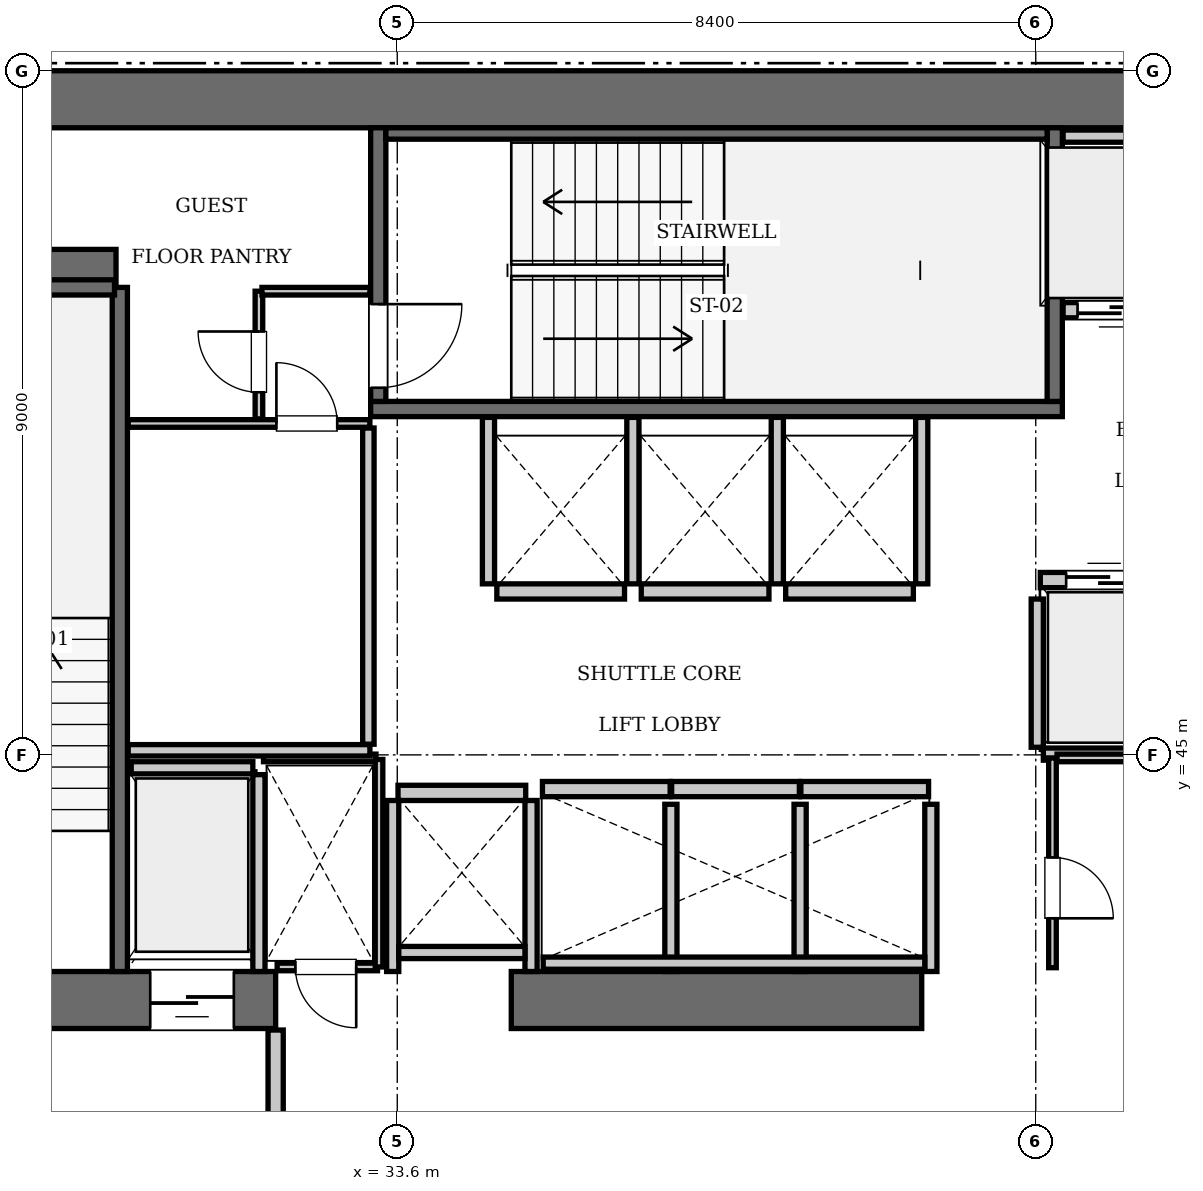
"""IFC4 building model, lengths in metres.
Left out: names, types, materials, properties, quantities, classifications, styles, units other than length and angle.
Written with IfcOpenShell. Run it as: python <this file> out.ifc"""

import sys

from ifc_helpers import new_model, si_unit, direction, frame, frame_2d, origin, place, context, subcontext, project, spatial, rectangle, extrude, element, fill, save


model = new_model("IFC4")
c1 = context("Model", 3, precision=1e-05, world=origin(), true_north=direction((0.0, 1.0)))
c2 = subcontext(c1, "Body", "Model", "MODEL_VIEW")
j1 = project(units=[si_unit("LENGTHUNIT", "METRE"), si_unit("PLANEANGLEUNIT", "RADIAN")], contexts=[c1])
p1 = place(None, origin())
s1 = spatial("IfcSite", under=j1, at=p1, CompositionType="ELEMENT")
p2 = place(p1, origin())
s2 = spatial("IfcBuilding", under=s1, at=p2, CompositionType="ELEMENT")
p3 = place(p2, frame((0.0, 0.0, 131.25)))
s3 = spatial("IfcBuildingStorey", under=s2, at=p3, CompositionType="ELEMENT", Elevation=131.25)
p4 = place(p3, frame((25.2, 53.625, 0.0), z_axis=(0.0, 0.0, 1.0), x_axis=(1.0, 0.0, 0.0)))
e1 = element("IfcWall", 1, at=p4, inside=s3, PredefinedType="SHEAR", context=c2, shape_type="SweptSolid", body=[
    extrude(rectangle(XDim=25.2, YDim=0.75, at=frame_2d((12.6, 0.0))), origin(), (0.0, 0.0, 1.0), 3.85),
])
p5 = place(p3, frame((25.2, 41.775, 0.0), z_axis=(0.0, 0.0, 1.0), x_axis=(1.0, 0.0, 0.0)))
e2 = element("IfcWall", 2, at=p5, inside=s3, PredefinedType="SHEAR", context=c2, shape_type="SweptSolid", body=[
    extrude(rectangle(XDim=6.8, YDim=0.75, at=frame_2d((3.4, 0.0))), origin(), (0.0, 0.0, 1.0), 3.85),
])
p6 = place(p5, frame((1.65, 0.0, 0.0)))
e3 = element("IfcOpeningElement", 3, at=p6, cuts=e2, PredefinedType="OPENING", context=c2, shape_type="SweptSolid", body=[
    extrude(rectangle(XDim=1.15, YDim=2.15, at=frame_2d((0.575, 1.075))), frame((0.0, 0.385, 0.0), z_axis=(0.0, -1.0, 0.0), x_axis=(1.0, 0.0, 0.0)), (0.0, 0.0, 1.0), 0.77),
])
p7 = place(p5, frame((5.15, 0.0, 0.0)))
e4 = element("IfcOpeningElement", 4, at=p7, cuts=e2, PredefinedType="OPENING", context=c2, shape_type="SweptSolid", body=[
    extrude(rectangle(XDim=1.1, YDim=2.2, at=frame_2d((0.55, 1.1))), frame((0.0, 0.385, 0.0), z_axis=(0.0, -1.0, 0.0), x_axis=(1.0, 0.0, 0.0)), (0.0, 0.0, 1.0), 0.77),
])
p8 = place(p3, frame((35.1, 41.775, 0.0), z_axis=(0.0, 0.0, 1.0), x_axis=(1.0, 0.0, 0.0)))
e5 = element("IfcWall", 5, at=p8, inside=s3, PredefinedType="SHEAR", context=c2, shape_type="SweptSolid", body=[
    extrude(rectangle(XDim=5.4, YDim=0.75, at=frame_2d((2.7, 0.0))), origin(), (0.0, 0.0, 1.0), 3.85),
])
p9 = place(p3, frame((25.95, 51.4, 0.0), z_axis=(0.0, 0.0, 1.0), x_axis=(1.0, 0.0, 0.0)))
e6 = element("IfcWall", 6, at=p9, inside=s3, PredefinedType="SHEAR", context=c2, shape_type="SweptSolid", body=[
    extrude(rectangle(XDim=3.95, YDim=0.5, at=frame_2d((1.975, 0.0))), origin(), (0.0, 0.0, 1.0), 3.85),
])
p10 = place(p3, frame((29.95, 42.15, 0.0), z_axis=(0.0, 0.0, 1.0), x_axis=(0.0, 1.0, 0.0)))
e7 = element("IfcWall", 7, at=p10, inside=s3, PredefinedType="SOLIDWALL", context=c2, shape_type="SweptSolid", body=[
    extrude(rectangle(XDim=9.0, YDim=0.2, at=frame_2d((4.5, 0.0))), origin(), (0.0, 0.0, 1.0), 3.61),
])
p11 = place(p3, frame((26.38, 51.15, 0.0), z_axis=(0.0, 0.0, 1.0), x_axis=(1.0, 0.0, 0.0)))
e8 = element("IfcWall", 8, at=p11, inside=s3, PredefinedType="SOLIDWALL", context=c2, shape_type="SweptSolid", body=[
    extrude(rectangle(XDim=3.5, YDim=0.2, at=frame_2d((1.75, 0.0))), origin(), (0.0, 0.0, 1.0), 3.61),
])
p12 = place(p3, frame((33.25, 49.55, 0.0), z_axis=(0.0, 0.0, 1.0), x_axis=(1.0, 0.0, 0.0)))
e9 = element("IfcWall", 9, at=p12, inside=s3, PredefinedType="SOLIDWALL", context=c2, shape_type="SweptSolid", body=[
    extrude(rectangle(XDim=9.1, YDim=0.2, at=frame_2d((4.55, 0.0))), origin(), (0.0, 0.0, 1.0), 3.61),
])
p13 = place(p3, frame((42.25, 49.65, 0.0), z_axis=(0.0, 0.0, 1.0), x_axis=(0.0, 1.0, 0.0)))
e10 = element("IfcWall", 10, at=p13, inside=s3, PredefinedType="SOLIDWALL", context=c2, shape_type="SweptSolid", body=[
    extrude(rectangle(XDim=3.6, YDim=0.2, at=frame_2d((1.8, 0.0))), origin(), (0.0, 0.0, 1.0), 3.61),
])
p14 = place(p3, frame((33.35, 49.65, 0.0), z_axis=(0.0, 0.0, 1.0), x_axis=(0.0, 1.0, 0.0)))
e11 = element("IfcWall", 11, at=p14, inside=s3, PredefinedType="SOLIDWALL", context=c2, shape_type="SweptSolid", body=[
    extrude(rectangle(XDim=3.6, YDim=0.2, at=frame_2d((1.8, 0.0))), origin(), (0.0, 0.0, 1.0), 3.61),
])
p15 = place(p14, frame((0.18, 0.0, 0.0)))
e12 = element("IfcOpeningElement", 12, at=p15, cuts=e11, PredefinedType="OPENING", context=c2, shape_type="SweptSolid", body=[
    extrude(rectangle(XDim=1.1, YDim=2.15, at=frame_2d((0.55, 1.075))), frame((0.0, 0.11, 0.0), z_axis=(0.0, -1.0, 0.0), x_axis=(1.0, 0.0, 0.0)), (0.0, 0.0, 1.0), 0.22),
])
p16 = place(p3, frame((33.45, 53.175, 0.0), z_axis=(0.0, 0.0, 1.0), x_axis=(1.0, 0.0, 0.0)))
e13 = element("IfcWall", 13, at=p16, inside=s3, PredefinedType="SOLIDWALL", context=c2, shape_type="SweptSolid", body=[
    extrude(rectangle(XDim=8.7, YDim=0.15, at=frame_2d((4.35, 0.0))), origin(), (0.0, 0.0, 1.0), 3.61),
])
p17 = place(p3, frame((42.06, 47.3, 0.0), z_axis=(0.0, 0.0, 1.0), x_axis=(1.0, 0.0, 0.0)))
e14 = element("IfcWall", 14, at=p17, inside=s3, PredefinedType="SOLIDWALL", context=c2, shape_type="SweptSolid", body=[
    extrude(rectangle(XDim=1.68, YDim=0.2, at=frame_2d((0.84, 0.0))), origin(), (0.0, 0.0, 1.0), 3.61),
])
p18 = place(p17, frame((0.34, 0.0, 0.0)))
e15 = element("IfcOpeningElement", 15, at=p18, cuts=e14, PredefinedType="OPENING", context=c2, shape_type="SweptSolid", body=[
    extrude(rectangle(XDim=1.0, YDim=2.15, at=frame_2d((0.5, 1.075))), frame((0.0, 0.11, 0.0), z_axis=(0.0, -1.0, 0.0), x_axis=(1.0, 0.0, 0.0)), (0.0, 0.0, 1.0), 0.22),
])
p19 = place(p3, frame((42.36, 50.85, 0.0), z_axis=(0.0, 0.0, 1.0), x_axis=(1.0, 0.0, 0.0)))
e16 = element("IfcWall", 16, at=p19, inside=s3, PredefinedType="SOLIDWALL", context=c2, shape_type="SweptSolid", body=[
    extrude(rectangle(XDim=1.38, YDim=0.2, at=frame_2d((0.69, 0.0))), origin(), (0.0, 0.0, 1.0), 3.61),
])
p20 = place(p19, frame((0.19, 0.0, 0.0)))
e17 = element("IfcOpeningElement", 17, at=p20, cuts=e16, PredefinedType="OPENING", context=c2, shape_type="SweptSolid", body=[
    extrude(rectangle(XDim=1.0, YDim=2.15, at=frame_2d((0.5, 1.075))), frame((0.0, 0.11, 0.0), z_axis=(0.0, -1.0, 0.0), x_axis=(1.0, 0.0, 0.0)), (0.0, 0.0, 1.0), 0.22),
])
for number, where, z_axis, x_axis in (
    (18, (35.51, 44.55, 0.0), (0.0, 0.0, 1.0), (1.0, 0.0, 0.0)),
    (19, (37.21, 44.55, 0.0), (0.0, 0.0, 1.0), (1.0, 0.0, 0.0)),
):
    element("IfcWall", number, at=place(p3, frame(where, z_axis=z_axis, x_axis=x_axis)), inside=s3, PredefinedType="SOLIDWALL", context=c2, shape_type="SweptSolid", body=[
        extrude(rectangle(XDim=1.68, YDim=0.2, at=frame_2d((0.84, 0.0))), origin(), (0.0, 0.0, 1.0), 3.61),
    ])
for number, where, z_axis, x_axis in (
    (20, (38.91, 44.55, 0.0), (0.0, 0.0, 1.0), (1.0, 0.0, 0.0)),
    (21, (34.91, 47.15, 0.0), (0.0, 0.0, 1.0), (1.0, 0.0, 0.0)),
):
    element("IfcWall", number, at=place(p3, frame(where, z_axis=z_axis, x_axis=x_axis)), inside=s3, PredefinedType="SOLIDWALL", context=c2, shape_type="SweptSolid", body=[
        extrude(rectangle(XDim=1.68, YDim=0.2, at=frame_2d((0.84, 0.0))), origin(), (0.0, 0.0, 1.0), 3.61),
    ])
for number, where, z_axis, x_axis in (
    (22, (36.81, 47.15, 0.0), (0.0, 0.0, 1.0), (1.0, 0.0, 0.0)),
    (23, (38.71, 47.15, 0.0), (0.0, 0.0, 1.0), (1.0, 0.0, 0.0)),
    (24, (33.61, 44.5, 0.0), (0.0, 0.0, 1.0), (1.0, 0.0, 0.0)),
):
    element("IfcWall", number, at=place(p3, frame(where, z_axis=z_axis, x_axis=x_axis)), inside=s3, PredefinedType="SOLIDWALL", context=c2, shape_type="SweptSolid", body=[
        extrude(rectangle(XDim=1.68, YDim=0.2, at=frame_2d((0.84, 0.0))), origin(), (0.0, 0.0, 1.0), 3.61),
    ])
p21 = place(p3, frame((30.1, 44.83, 0.0), z_axis=(0.0, 0.0, 1.0), x_axis=(1.0, 0.0, 0.0)))
e25 = element("IfcWall", 25, at=p21, inside=s3, PredefinedType="SOLIDWALL", context=c2, shape_type="SweptSolid", body=[
    extrude(rectangle(XDim=1.6, YDim=0.16, at=frame_2d((0.8, 0.0))), origin(), (0.0, 0.0, 1.0), 3.61),
])
p22 = place(p3, frame((31.78, 42.15, 0.0), z_axis=(0.0, 0.0, 1.0), x_axis=(0.0, 1.0, 0.0)))
e26 = element("IfcWall", 26, at=p22, inside=s3, PredefinedType="SOLIDWALL", context=c2, shape_type="SweptSolid", body=[
    extrude(rectangle(XDim=2.59, YDim=0.16, at=frame_2d((1.295, 0.0))), origin(), (0.0, 0.0, 1.0), 3.61),
])
p23 = place(p3, frame((42.02, 45.1, 0.0), z_axis=(0.0, 0.0, 1.0), x_axis=(0.0, 1.0, 0.0)))
e27 = element("IfcWall", 27, at=p23, inside=s3, PredefinedType="SOLIDWALL", context=c2, shape_type="SweptSolid", body=[
    extrude(rectangle(XDim=1.95, YDim=0.16, at=frame_2d((0.975, 0.0))), origin(), (0.0, 0.0, 1.0), 3.61),
])
p24 = place(p3, frame((42.1, 45.01, 0.0), z_axis=(0.0, 0.0, 1.0), x_axis=(1.0, 0.0, 0.0)))
e28 = element("IfcWall", 28, at=p24, inside=s3, PredefinedType="SOLIDWALL", context=c2, shape_type="SweptSolid", body=[
    extrude(rectangle(XDim=3.45, YDim=0.16, at=frame_2d((1.725, 0.0))), origin(), (0.0, 0.0, 1.0), 3.61),
])
p25 = place(p3, frame((42.36, 53.14, 0.0), z_axis=(0.0, 0.0, 1.0), x_axis=(1.0, 0.0, 0.0)))
e29 = element("IfcWall", 29, at=p25, inside=s3, PredefinedType="SOLIDWALL", context=c2, shape_type="SweptSolid", body=[
    extrude(rectangle(XDim=3.14, YDim=0.16, at=frame_2d((1.57, 0.0))), origin(), (0.0, 0.0, 1.0), 3.61),
])
for number, where, z_axis, x_axis in (
    (30, (37.2, 42.15, 0.0), (0.0, 0.0, 1.0), (0.0, 1.0, 0.0)),
    (31, (38.9, 42.15, 0.0), (0.0, 0.0, 1.0), (0.0, 1.0, 0.0)),
    (32, (40.62, 42.15, 0.0), (0.0, 0.0, 1.0), (0.0, 1.0, 0.0)),
):
    element("IfcWall", number, at=place(p3, frame(where, z_axis=z_axis, x_axis=x_axis)), inside=s3, PredefinedType="SOLIDWALL", context=c2, shape_type="SweptSolid", body=[
        extrude(rectangle(XDim=2.2, YDim=0.16, at=frame_2d((1.1, 0.0))), origin(), (0.0, 0.0, 1.0), 3.61),
    ])
p26 = place(p3, frame((35.52, 42.26, 0.0), z_axis=(0.0, 0.0, 1.0), x_axis=(1.0, 0.0, 0.0)))
e33 = element("IfcWall", 33, at=p26, inside=s3, PredefinedType="SOLIDWALL", context=c2, shape_type="SweptSolid", body=[
    extrude(rectangle(XDim=5.02, YDim=0.16, at=frame_2d((2.51, 0.0))), origin(), (0.0, 0.0, 1.0), 3.61),
])
for number, where, z_axis, x_axis in (
    (34, (34.8, 47.25, 0.0), (0.0, 0.0, 1.0), (0.0, 1.0, 0.0)),
    (35, (36.7, 47.25, 0.0), (0.0, 0.0, 1.0), (0.0, 1.0, 0.0)),
    (36, (38.6, 47.25, 0.0), (0.0, 0.0, 1.0), (0.0, 1.0, 0.0)),
    (37, (40.5, 47.25, 0.0), (0.0, 0.0, 1.0), (0.0, 1.0, 0.0)),
):
    element("IfcWall", number, at=place(p3, frame(where, z_axis=z_axis, x_axis=x_axis)), inside=s3, PredefinedType="SOLIDWALL", context=c2, shape_type="SweptSolid", body=[
        extrude(rectangle(XDim=2.19, YDim=0.16, at=frame_2d((1.095, 0.0))), origin(), (0.0, 0.0, 1.0), 3.61),
    ])
for number, where, z_axis, x_axis in (
    (38, (33.54, 42.15, 0.0), (0.0, 0.0, 1.0), (0.0, 1.0, 0.0)),
    (39, (35.36, 42.15, 0.0), (0.0, 0.0, 1.0), (0.0, 1.0, 0.0)),
):
    element("IfcWall", number, at=place(p3, frame(where, z_axis=z_axis, x_axis=x_axis)), inside=s3, PredefinedType="SOLIDWALL", context=c2, shape_type="SweptSolid", body=[
        extrude(rectangle(XDim=2.25, YDim=0.16, at=frame_2d((1.125, 0.0))), origin(), (0.0, 0.0, 1.0), 3.61),
    ])
p27 = place(p3, frame((33.62, 42.4, 0.0), z_axis=(0.0, 0.0, 1.0), x_axis=(1.0, 0.0, 0.0)))
e40 = element("IfcWall", 40, at=p27, inside=s3, PredefinedType="SOLIDWALL", context=c2, shape_type="SweptSolid", body=[
    extrude(rectangle(XDim=1.66, YDim=0.16, at=frame_2d((0.83, 0.0))), origin(), (0.0, 0.0, 1.0), 3.61),
])
p28 = place(p3, frame((32.0, 38.31, 0.0), z_axis=(0.0, 0.0, 1.0), x_axis=(0.0, 1.0, 0.0)))
e41 = element("IfcWall", 41, at=p28, inside=s3, PredefinedType="PARTITIONING", context=c2, shape_type="SweptSolid", body=[
    extrude(rectangle(XDim=3.07, YDim=0.2, at=frame_2d((1.535, 0.0))), origin(), (0.0, 0.0, 1.0), 3.61),
])
p29 = place(p3, frame((32.02, 42.21, 0.0), z_axis=(0.0, 0.0, 1.0), x_axis=(1.0, 0.0, 0.0)))
e42 = element("IfcWall", 42, at=p29, inside=s3, PredefinedType="PARTITIONING", context=c2, shape_type="SweptSolid", body=[
    extrude(rectangle(XDim=1.32, YDim=0.1, at=frame_2d((0.66, 0.0))), origin(), (0.0, 0.0, 1.0), 3.61),
])
p30 = place(p29, frame((0.24, 0.0, 0.0)))
e43 = element("IfcOpeningElement", 43, at=p30, cuts=e42, PredefinedType="OPENING", context=c2, shape_type="SweptSolid", body=[
    extrude(rectangle(XDim=0.8, YDim=2.05, at=frame_2d((0.4, 1.025))), frame((0.0, 0.06, 0.0), z_axis=(0.0, -1.0, 0.0), x_axis=(1.0, 0.0, 0.0)), (0.0, 0.0, 1.0), 0.12),
])
p31 = place(p3, frame((31.84, 44.96, 0.0), z_axis=(0.0, 0.0, 1.0), x_axis=(1.0, 0.0, 0.0)))
e44 = element("IfcWall", 44, at=p31, inside=s3, PredefinedType="PARTITIONING", context=c2, shape_type="SweptSolid", body=[
    extrude(rectangle(XDim=1.48, YDim=0.1, at=frame_2d((0.74, 0.0))), origin(), (0.0, 0.0, 1.0), 3.61),
])
p32 = place(p3, frame((33.36, 42.21, 0.0), z_axis=(0.0, 0.0, 1.0), x_axis=(0.0, 1.0, 0.0)))
e45 = element("IfcWall", 45, at=p32, inside=s3, PredefinedType="PARTITIONING", context=c2, shape_type="SweptSolid", body=[
    extrude(rectangle(XDim=2.73, YDim=0.1, at=frame_2d((1.365, 0.0))), origin(), (0.0, 0.0, 1.0), 3.61),
])
p33 = place(p3, frame((42.22, 42.2, 0.0), z_axis=(0.0, 0.0, 1.0), x_axis=(0.0, 1.0, 0.0)))
e46 = element("IfcWall", 46, at=p33, inside=s3, PredefinedType="PARTITIONING", context=c2, shape_type="SweptSolid", body=[
    extrude(rectangle(XDim=2.76, YDim=0.1, at=frame_2d((1.38, 0.0))), origin(), (0.0, 0.0, 1.0), 3.61),
])
p34 = place(p33, frame((0.65, 0.0, 0.0)))
e47 = element("IfcOpeningElement", 47, at=p34, cuts=e46, PredefinedType="OPENING", context=c2, shape_type="SweptSolid", body=[
    extrude(rectangle(XDim=0.8, YDim=2.05, at=frame_2d((0.4, 1.025))), frame((0.0, 0.06, 0.0), z_axis=(0.0, -1.0, 0.0), x_axis=(1.0, 0.0, 0.0)), (0.0, 0.0, 1.0), 0.12),
])
p35 = place(p3, frame((42.28, 44.96, 0.0), z_axis=(0.0, 0.0, 1.0), x_axis=(1.0, 0.0, 0.0)))
e48 = element("IfcWall", 48, at=p35, inside=s3, PredefinedType="PARTITIONING", context=c2, shape_type="SweptSolid", body=[
    extrude(rectangle(XDim=1.3, YDim=0.1, at=frame_2d((0.65, 0.0))), origin(), (0.0, 0.0, 1.0), 3.61),
])
p36 = place(p3, frame((30.06, 45.06, 0.0), z_axis=(0.0, 0.0, 1.0), x_axis=(1.0, 0.0, 0.0)))
e49 = element("IfcWall", 49, at=p36, inside=s3, PredefinedType="PARTITIONING", context=c2, shape_type="SweptSolid", body=[
    extrude(rectangle(XDim=3.18, YDim=0.15, at=frame_2d((1.59, 0.0))), origin(), (0.0, 0.0, 1.0), 3.61),
])
p37 = place(p3, frame((33.22, 45.14, 0.0), z_axis=(0.0, 0.0, 1.0), x_axis=(0.0, 1.0, 0.0)))
e50 = element("IfcWall", 50, at=p37, inside=s3, PredefinedType="PARTITIONING", context=c2, shape_type="SweptSolid", body=[
    extrude(rectangle(XDim=4.16, YDim=0.15, at=frame_2d((2.08, 0.0))), origin(), (0.0, 0.0, 1.0), 3.61),
])
p38 = place(p3, frame((30.06, 49.36, 0.0), z_axis=(0.0, 0.0, 1.0), x_axis=(1.0, 0.0, 0.0)))
e51 = element("IfcWall", 51, at=p38, inside=s3, PredefinedType="PARTITIONING", context=c2, shape_type="SweptSolid", body=[
    extrude(rectangle(XDim=3.18, YDim=0.1, at=frame_2d((1.59, 0.0))), origin(), (0.0, 0.0, 1.0), 3.61),
])
p39 = place(p38, frame((1.95, 0.0, 0.0)))
e52 = element("IfcOpeningElement", 52, at=p39, cuts=e51, PredefinedType="OPENING", context=c2, shape_type="SweptSolid", body=[
    extrude(rectangle(XDim=0.8, YDim=2.05, at=frame_2d((0.4, 1.025))), frame((0.0, 0.06, 0.0), z_axis=(0.0, -1.0, 0.0), x_axis=(1.0, 0.0, 0.0)), (0.0, 0.0, 1.0), 0.12),
])
p40 = place(p3, frame((31.78, 49.42, 0.0), z_axis=(0.0, 0.0, 1.0), x_axis=(0.0, 1.0, 0.0)))
e53 = element("IfcWall", 53, at=p40, inside=s3, PredefinedType="PARTITIONING", context=c2, shape_type="SweptSolid", body=[
    extrude(rectangle(XDim=1.68, YDim=0.1, at=frame_2d((0.84, 0.0))), origin(), (0.0, 0.0, 1.0), 3.61),
])
p41 = place(p40, frame((0.35, 0.0, 0.0)))
e54 = element("IfcOpeningElement", 54, at=p41, cuts=e53, PredefinedType="OPENING", context=c2, shape_type="SweptSolid", body=[
    extrude(rectangle(XDim=0.8, YDim=2.05, at=frame_2d((0.4, 1.025))), frame((0.0, 0.06, 0.0), z_axis=(0.0, -1.0, 0.0), x_axis=(1.0, 0.0, 0.0)), (0.0, 0.0, 1.0), 0.12),
])
p42 = place(p3, frame((31.82, 51.1, 0.0), z_axis=(0.0, 0.0, 1.0), x_axis=(1.0, 0.0, 0.0)))
e55 = element("IfcWall", 55, at=p42, inside=s3, PredefinedType="PARTITIONING", context=c2, shape_type="SweptSolid", body=[
    extrude(rectangle(XDim=1.42, YDim=0.1, at=frame_2d((0.71, 0.0))), origin(), (0.0, 0.0, 1.0), 3.61),
])
p43 = place(p15, frame((1.1, 0.0, 0.0), z_axis=(0.0, 0.0, 1.0), x_axis=(-1.0, 0.0, 0.0)))
e56 = element("IfcDoor", 56, at=p43, inside=s3, OperationType="SINGLE_SWING_LEFT", PredefinedType="DOOR", context=c2, shape_type="SweptSolid", body=[
    extrude(rectangle(XDim=1.1, YDim=2.15, at=frame_2d((0.55, 1.075))), frame((0.0, 0.025, 0.0), z_axis=(0.0, -1.0, 0.0), x_axis=(1.0, 0.0, 0.0)), (0.0, 0.0, 1.0), 0.05),
])
fill(e12, e56)
p44 = place(p18, origin())
e57 = element("IfcDoor", 57, at=p44, inside=s3, OperationType="SLIDING_TO_LEFT", PredefinedType="DOOR", context=c2, shape_type="SweptSolid", body=[
    extrude(rectangle(XDim=1.0, YDim=2.15, at=frame_2d((0.5, 1.075))), frame((0.0, 0.025, 0.0), z_axis=(0.0, -1.0, 0.0), x_axis=(1.0, 0.0, 0.0)), (0.0, 0.0, 1.0), 0.05),
])
fill(e15, e57)
p45 = place(p20, frame((1.0, 0.0, 0.0), z_axis=(0.0, 0.0, 1.0), x_axis=(-1.0, 0.0, 0.0)))
e58 = element("IfcDoor", 58, at=p45, inside=s3, OperationType="SLIDING_TO_LEFT", PredefinedType="DOOR", context=c2, shape_type="SweptSolid", body=[
    extrude(rectangle(XDim=1.0, YDim=2.15, at=frame_2d((0.5, 1.075))), frame((0.0, 0.025, 0.0), z_axis=(0.0, -1.0, 0.0), x_axis=(1.0, 0.0, 0.0)), (0.0, 0.0, 1.0), 0.05),
])
fill(e17, e58)
p46 = place(p7, frame((1.1, 0.0, 0.0), z_axis=(0.0, 0.0, 1.0), x_axis=(-1.0, 0.0, 0.0)))
e59 = element("IfcDoor", 59, at=p46, inside=s3, OperationType="SLIDING_TO_LEFT", PredefinedType="DOOR", context=c2, shape_type="SweptSolid", body=[
    extrude(rectangle(XDim=1.1, YDim=2.2, at=frame_2d((0.55, 1.1))), frame((0.0, 0.025, 0.0), z_axis=(0.0, -1.0, 0.0), x_axis=(1.0, 0.0, 0.0)), (0.0, 0.0, 1.0), 0.05),
])
fill(e4, e59)
p47 = place(p30, frame((0.8, 0.0, 0.0), z_axis=(0.0, 0.0, 1.0), x_axis=(-1.0, 0.0, 0.0)))
e60 = element("IfcDoor", 60, at=p47, inside=s3, OperationType="SINGLE_SWING_LEFT", PredefinedType="DOOR", context=c2, shape_type="SweptSolid", body=[
    extrude(rectangle(XDim=0.8, YDim=2.05, at=frame_2d((0.4, 1.025))), frame((0.0, 0.025, 0.0), z_axis=(0.0, -1.0, 0.0), x_axis=(1.0, 0.0, 0.0)), (0.0, 0.0, 1.0), 0.05),
])
fill(e43, e60)
p48 = place(p34, frame((0.8, 0.0, 0.0), z_axis=(0.0, 0.0, 1.0), x_axis=(-1.0, 0.0, 0.0)))
e61 = element("IfcDoor", 61, at=p48, inside=s3, OperationType="SINGLE_SWING_RIGHT", PredefinedType="DOOR", context=c2, shape_type="SweptSolid", body=[
    extrude(rectangle(XDim=0.8, YDim=2.05, at=frame_2d((0.4, 1.025))), frame((0.0, 0.025, 0.0), z_axis=(0.0, -1.0, 0.0), x_axis=(1.0, 0.0, 0.0)), (0.0, 0.0, 1.0), 0.05),
])
fill(e47, e61)
p49 = place(p39, origin())
e62 = element("IfcDoor", 62, at=p49, inside=s3, OperationType="SINGLE_SWING_LEFT", PredefinedType="DOOR", context=c2, shape_type="SweptSolid", body=[
    extrude(rectangle(XDim=0.8, YDim=2.05, at=frame_2d((0.4, 1.025))), frame((0.0, 0.025, 0.0), z_axis=(0.0, -1.0, 0.0), x_axis=(1.0, 0.0, 0.0)), (0.0, 0.0, 1.0), 0.05),
])
fill(e52, e62)
p50 = place(p41, origin())
e63 = element("IfcDoor", 63, at=p50, inside=s3, OperationType="SINGLE_SWING_RIGHT", PredefinedType="DOOR", context=c2, shape_type="SweptSolid", body=[
    extrude(rectangle(XDim=0.8, YDim=2.05, at=frame_2d((0.4, 1.025))), frame((0.0, 0.025, 0.0), z_axis=(0.0, -1.0, 0.0), x_axis=(1.0, 0.0, 0.0)), (0.0, 0.0, 1.0), 0.05),
])
fill(e54, e63)
save(model, sys.argv[1])
